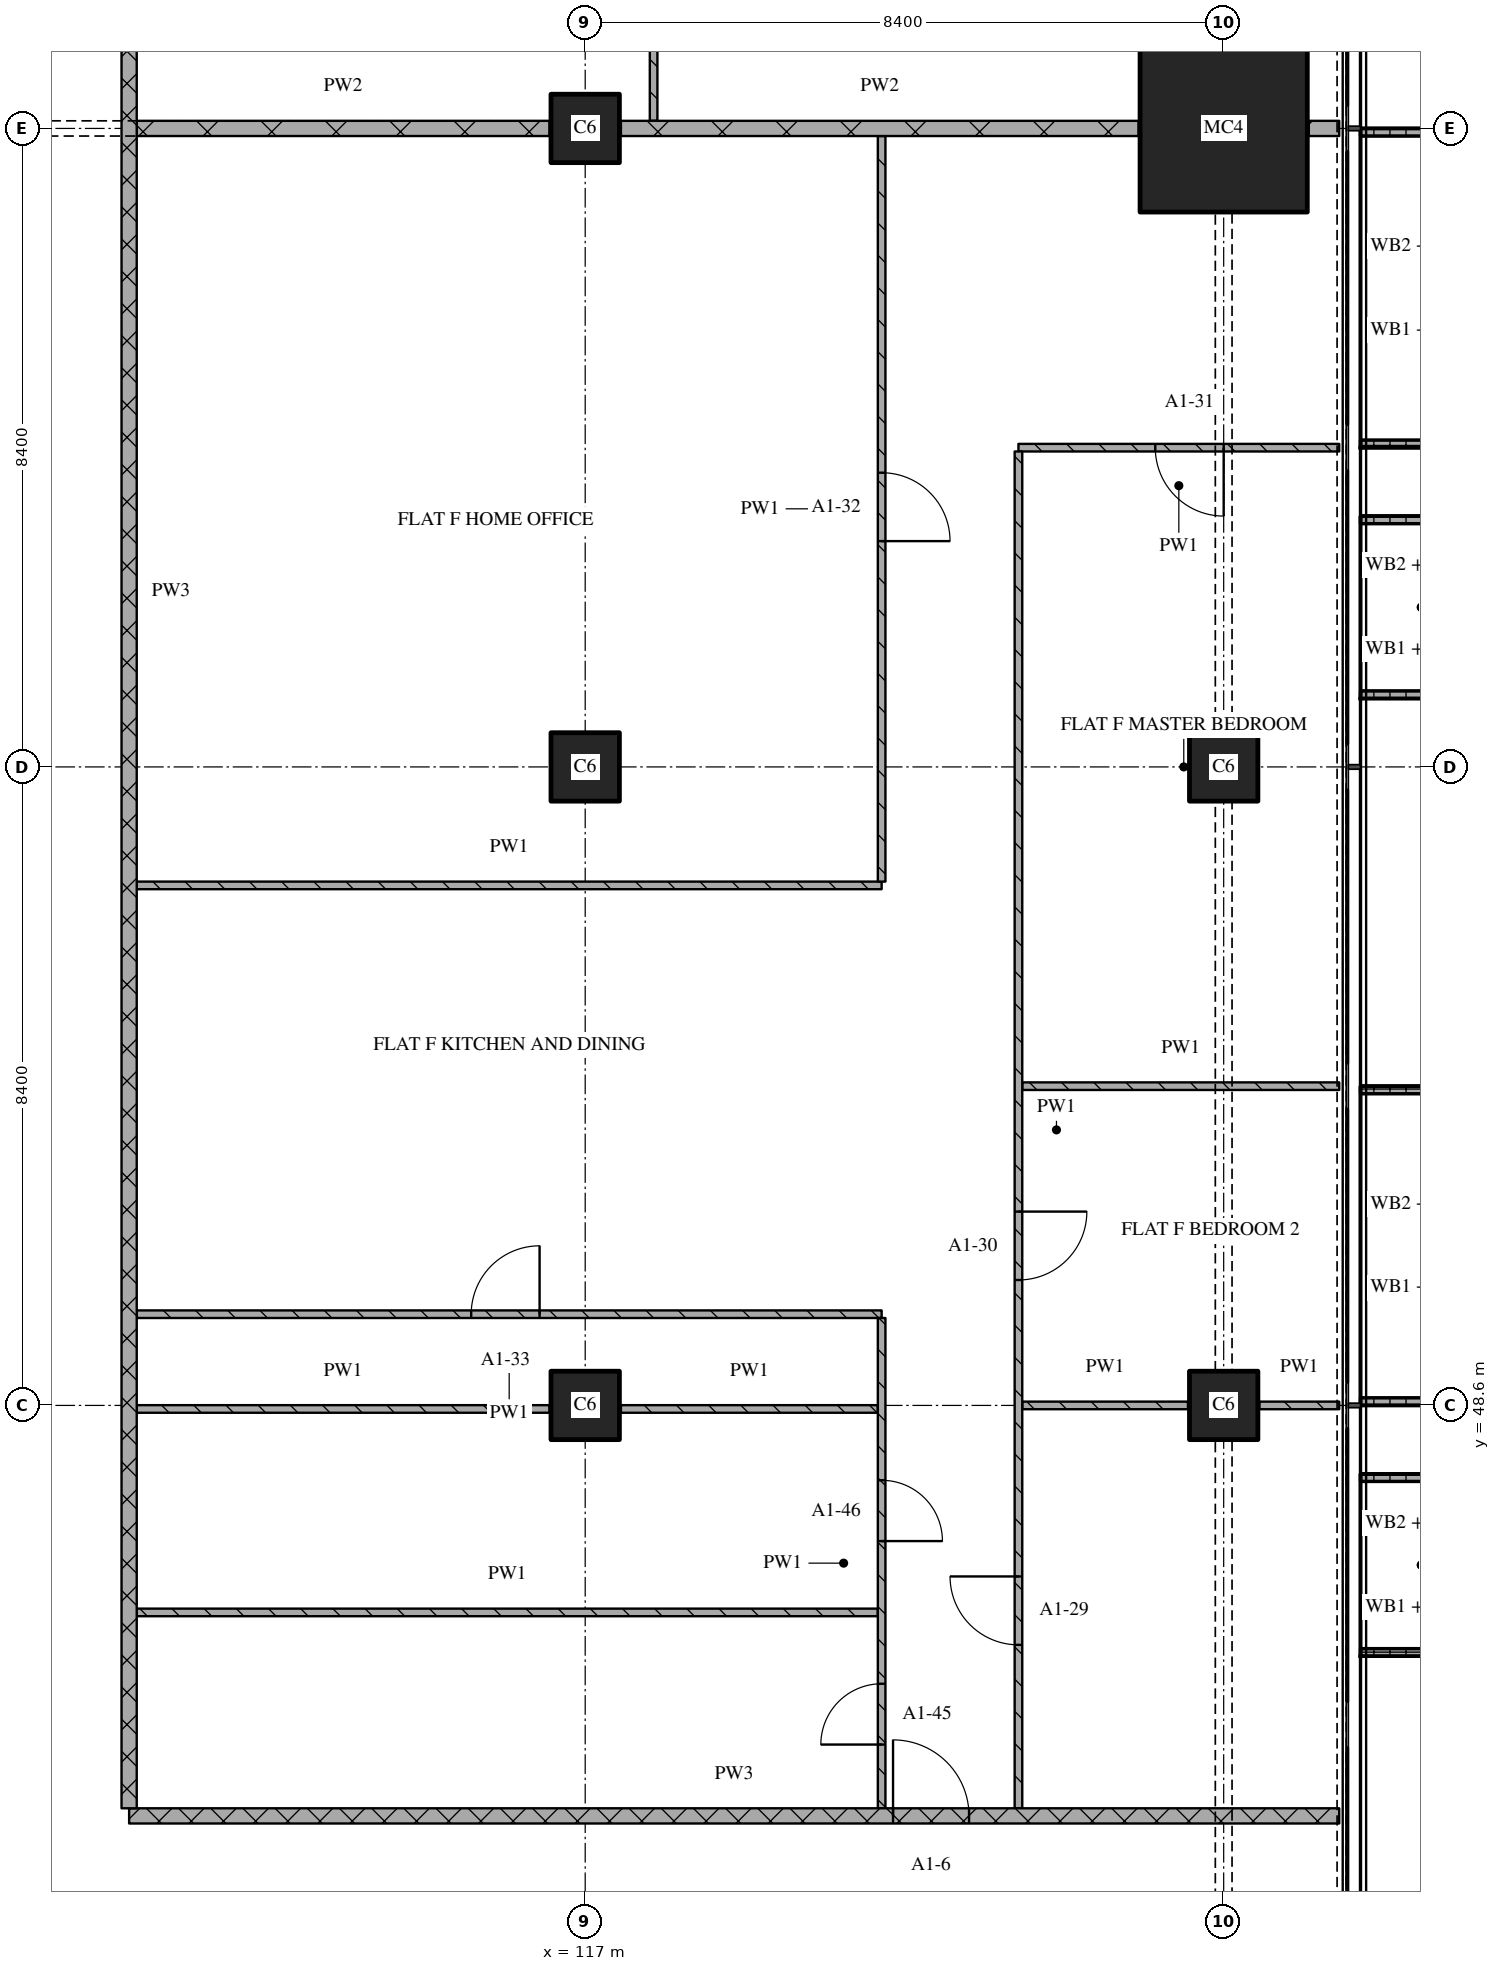
"""IFC4 building model, lengths in metres.
Left out: names, types, materials, properties, quantities, classifications, styles, units other than length and angle.
Written with IfcOpenShell. Run it as: python <this file> out.ifc"""

import sys

from ifc_helpers import new_model, si_unit, direction, frame, frame_2d, origin, origin_2d, place, context, subcontext, project, spatial, polyline, rectangle, outline, extrude, element, fill, save


model = new_model("IFC4")
c1 = context("Model", 3, precision=1e-05, world=origin(), true_north=direction((0.0, 1.0)))
c2 = subcontext(c1, "Body", "Model", "MODEL_VIEW")
j1 = project(units=[si_unit("LENGTHUNIT", "METRE"), si_unit("PLANEANGLEUNIT", "RADIAN")], contexts=[c1])
p1 = place(None, origin())
s1 = spatial("IfcSite", under=j1, at=p1, CompositionType="ELEMENT")
p2 = place(p1, origin())
s2 = spatial("IfcBuilding", under=s1, at=p2, CompositionType="ELEMENT")
p3 = place(p2, frame((0.0, 0.0, 40.8)))
s3 = spatial("IfcBuildingStorey", under=s2, at=p3, CompositionType="ELEMENT", Elevation=40.8)
for number, where, z_axis, x_axis in (
    (1, (117.0, 48.6, 0.0), (0.0, 0.0, 1.0), (1.0, 0.0, 0.0)),
    (2, (117.0, 57.0, 0.0), (0.0, 0.0, 1.0), (1.0, 0.0, 0.0)),
    (3, (117.0, 65.4, 0.0), (0.0, 0.0, 1.0), (1.0, 0.0, 0.0)),
    (4, (125.4, 48.6, 0.0), (0.0, 0.0, 1.0), (1.0, 0.0, 0.0)),
    (5, (125.4, 57.0, 0.0), (0.0, 0.0, 1.0), (1.0, 0.0, 0.0)),
):
    element("IfcColumn", number, at=place(p3, frame(where, z_axis=z_axis, x_axis=x_axis)), inside=s3, PredefinedType="COLUMN", context=c2, shape_type="SweptSolid", body=[
        extrude(rectangle(XDim=0.9, YDim=0.9, at=origin_2d()), origin(), (0.0, 0.0, 1.0), 3.6),
    ])
p4 = place(p3, frame((125.4, 65.4, 0.0), z_axis=(0.0, 0.0, 1.0), x_axis=(1.0, 0.0, 0.0)))
e6 = element("IfcColumn", 6, at=p4, inside=s3, PredefinedType="COLUMN", context=c2, shape_type="SweptSolid", body=[
    extrude(rectangle(XDim=2.2, YDim=2.2, at=origin_2d()), origin(), (0.0, 0.0, 1.0), 3.6),
])
p5 = place(p3, origin())
e7 = element("IfcWall", 7, at=p5, inside=s3, PredefinedType="SOLIDWALL", context=c2, shape_type="SweptSolid", body=[
    extrude(outline(polyline([(127.2, 45.3), (127.2, 45.4), (128.7, 45.4), (128.7, 47.6), (127.2, 47.6), (127.2, 47.7), (128.8, 47.7), (128.8, 45.3), (127.2, 45.3)])), origin(), (0.0, 0.0, 1.0), 1.0),
])
p6 = place(p3, origin())
e8 = element("IfcWall", 8, at=p6, inside=s3, PredefinedType="SOLIDWALL", context=c2, shape_type="SweptSolid", body=[
    extrude(outline(polyline([(127.2, 48.6), (127.2, 48.7), (128.833, 48.7), (128.833, 52.7), (127.2, 52.7), (127.2, 52.8), (128.933, 52.8), (128.933, 48.6), (127.2, 48.6)])), origin(), (0.0, 0.0, 1.0), 1.0),
])
p7 = place(p3, origin())
e9 = element("IfcWall", 9, at=p7, inside=s3, PredefinedType="SOLIDWALL", context=c2, shape_type="SweptSolid", body=[
    extrude(outline(polyline([(127.2, 57.9), (127.2, 58.0), (128.7, 58.0), (128.7, 60.2), (127.2, 60.2), (127.2, 60.3), (128.8, 60.3), (128.8, 57.9), (127.2, 57.9)])), origin(), (0.0, 0.0, 1.0), 1.0),
])
p8 = place(p3, origin())
e10 = element("IfcWall", 10, at=p8, inside=s3, PredefinedType="SOLIDWALL", context=c2, shape_type="SweptSolid", body=[
    extrude(outline(polyline([(127.2, 61.2), (127.2, 61.3), (128.833, 61.3), (128.833, 65.3), (127.2, 65.3), (127.2, 65.4), (128.933, 65.4), (128.933, 61.2), (127.2, 61.2)])), origin(), (0.0, 0.0, 1.0), 1.0),
])
p9 = place(p3, frame((111.0, 43.2, 0.0), z_axis=(0.0, 0.0, 1.0), x_axis=(1.0, 0.0, 0.0)))
e11 = element("IfcWall", 11, at=p9, inside=s3, PredefinedType="PARTITIONING", context=c2, shape_type="SweptSolid", body=[
    extrude(rectangle(XDim=15.92, YDim=0.2, at=frame_2d((7.96, 0.0))), origin(), (0.0, 0.0, 1.0), 3.32),
])
p10 = place(p9, frame((10.05, 0.0, 0.0)))
e12 = element("IfcOpeningElement", 12, at=p10, cuts=e11, PredefinedType="OPENING", context=c2, shape_type="SweptSolid", body=[
    extrude(rectangle(XDim=1.0, YDim=2.1, at=frame_2d((0.5, 1.05))), frame((0.0, 0.11, 0.0), z_axis=(0.0, -1.0, 0.0), x_axis=(1.0, 0.0, 0.0)), (0.0, 0.0, 1.0), 0.22),
])
p11 = place(p3, frame((111.1, 45.877, 0.0), z_axis=(0.0, 0.0, 1.0), x_axis=(1.0, 0.0, 0.0)))
e13 = element("IfcWall", 13, at=p11, inside=s3, PredefinedType="PARTITIONING", context=c2, shape_type="SweptSolid", body=[
    extrude(rectangle(XDim=9.75, YDim=0.1, at=frame_2d((4.875, 0.0))), origin(), (0.0, 0.0, 1.0), 3.32),
])
p12 = place(p3, frame((111.1, 48.553, 0.0), z_axis=(0.0, 0.0, 1.0), x_axis=(1.0, 0.0, 0.0)))
e14 = element("IfcWall", 14, at=p12, inside=s3, PredefinedType="PARTITIONING", context=c2, shape_type="SweptSolid", body=[
    extrude(rectangle(XDim=5.43, YDim=0.1, at=frame_2d((2.715, 0.0))), origin(), (0.0, 0.0, 1.0), 3.32),
])
p13 = place(p3, frame((117.47, 48.553, 0.0), z_axis=(0.0, 0.0, 1.0), x_axis=(1.0, 0.0, 0.0)))
e15 = element("IfcWall", 15, at=p13, inside=s3, PredefinedType="PARTITIONING", context=c2, shape_type="SweptSolid", body=[
    extrude(rectangle(XDim=3.38, YDim=0.1, at=frame_2d((1.69, 0.0))), origin(), (0.0, 0.0, 1.0), 3.32),
])
p14 = place(p3, frame((122.75, 48.6, 0.0), z_axis=(0.0, 0.0, 1.0), x_axis=(1.0, 0.0, 0.0)))
e16 = element("IfcWall", 16, at=p14, inside=s3, PredefinedType="PARTITIONING", context=c2, shape_type="SweptSolid", body=[
    extrude(rectangle(XDim=2.18, YDim=0.1, at=frame_2d((1.09, 0.0))), origin(), (0.0, 0.0, 1.0), 3.32),
])
p15 = place(p3, frame((125.87, 48.6, 0.0), z_axis=(0.0, 0.0, 1.0), x_axis=(1.0, 0.0, 0.0)))
e17 = element("IfcWall", 17, at=p15, inside=s3, PredefinedType="PARTITIONING", context=c2, shape_type="SweptSolid", body=[
    extrude(rectangle(XDim=1.05, YDim=0.1, at=frame_2d((0.525, 0.0))), origin(), (0.0, 0.0, 1.0), 3.32),
])
p16 = place(p3, frame((120.9, 49.8, 0.0), z_axis=(0.0, 0.0, 1.0), x_axis=(-1.0, 0.0, 0.0)))
e18 = element("IfcWall", 18, at=p16, inside=s3, PredefinedType="PARTITIONING", context=c2, shape_type="SweptSolid", body=[
    extrude(rectangle(XDim=9.8, YDim=0.1, at=frame_2d((4.9, 0.0))), origin(), (0.0, 0.0, 1.0), 3.32),
])
p17 = place(p16, frame((4.5, 0.0, 0.0)))
e19 = element("IfcOpeningElement", 19, at=p17, cuts=e18, PredefinedType="OPENING", context=c2, shape_type="SweptSolid", body=[
    extrude(rectangle(XDim=0.9, YDim=2.1, at=frame_2d((0.45, 1.05))), frame((0.0, 0.06, 0.0), z_axis=(0.0, -1.0, 0.0), x_axis=(1.0, 0.0, 0.0)), (0.0, 0.0, 1.0), 0.12),
])
p18 = place(p3, frame((122.75, 52.8, 0.0), z_axis=(0.0, 0.0, 1.0), x_axis=(1.0, 0.0, 0.0)))
e20 = element("IfcWall", 20, at=p18, inside=s3, PredefinedType="PARTITIONING", context=c2, shape_type="SweptSolid", body=[
    extrude(rectangle(XDim=4.17, YDim=0.1, at=frame_2d((2.085, 0.0))), origin(), (0.0, 0.0, 1.0), 3.32),
])
p19 = place(p3, frame((111.1, 55.441, 0.0), z_axis=(0.0, 0.0, 1.0), x_axis=(1.0, 0.0, 0.0)))
e21 = element("IfcWall", 21, at=p19, inside=s3, PredefinedType="PARTITIONING", context=c2, shape_type="SweptSolid", body=[
    extrude(rectangle(XDim=9.8, YDim=0.1, at=frame_2d((4.9, 0.0))), origin(), (0.0, 0.0, 1.0), 3.32),
])
p20 = place(p3, frame((126.92, 61.2, 0.0), z_axis=(0.0, 0.0, 1.0), x_axis=(-1.0, 0.0, 0.0)))
e22 = element("IfcWall", 22, at=p20, inside=s3, PredefinedType="PARTITIONING", context=c2, shape_type="SweptSolid", body=[
    extrude(rectangle(XDim=4.22, YDim=0.1, at=frame_2d((2.11, 0.0))), origin(), (0.0, 0.0, 1.0), 3.32),
])
p21 = place(p20, frame((1.52, 0.0, 0.0)))
e23 = element("IfcOpeningElement", 23, at=p21, cuts=e22, PredefinedType="OPENING", context=c2, shape_type="SweptSolid", body=[
    extrude(rectangle(XDim=0.9, YDim=2.1, at=frame_2d((0.45, 1.05))), frame((0.0, 0.06, 0.0), z_axis=(0.0, -1.0, 0.0), x_axis=(1.0, 0.0, 0.0)), (0.0, 0.0, 1.0), 0.12),
])
p22 = place(p3, frame((111.1, 65.4, 0.0), z_axis=(0.0, 0.0, 1.0), x_axis=(1.0, 0.0, 0.0)))
e24 = element("IfcWall", 24, at=p22, inside=s3, PredefinedType="PARTITIONING", context=c2, shape_type="SweptSolid", body=[
    extrude(rectangle(XDim=5.43, YDim=0.2, at=frame_2d((2.715, 0.0))), origin(), (0.0, 0.0, 1.0), 2.82),
])
p23 = place(p3, frame((117.47, 65.4, 0.0), z_axis=(0.0, 0.0, 1.0), x_axis=(1.0, 0.0, 0.0)))
e25 = element("IfcWall", 25, at=p23, inside=s3, PredefinedType="PARTITIONING", context=c2, shape_type="SweptSolid", body=[
    extrude(rectangle(XDim=6.81, YDim=0.2, at=frame_2d((3.405, 0.0))), origin(), (0.0, 0.0, 1.0), 3.32),
])
p24 = place(p3, frame((126.52, 65.4, 0.0), z_axis=(0.0, 0.0, 1.0), x_axis=(1.0, 0.0, 0.0)))
e26 = element("IfcWall", 26, at=p24, inside=s3, PredefinedType="PARTITIONING", context=c2, shape_type="SweptSolid", body=[
    extrude(rectangle(XDim=0.4, YDim=0.2, at=frame_2d((0.2, 0.0))), origin(), (0.0, 0.0, 1.0), 3.32),
])
p25 = place(p3, frame((111.0, 75.32, 0.0), z_axis=(0.0, 0.0, 1.0), x_axis=(0.0, -1.0, 0.0)))
e27 = element("IfcWall", 27, at=p25, inside=s3, PredefinedType="PARTITIONING", context=c2, shape_type="SweptSolid", body=[
    extrude(rectangle(XDim=32.02, YDim=0.2, at=frame_2d((16.01, 0.0))), origin(), (0.0, 0.0, 1.0), 3.32),
])
p26 = place(p25, frame((5.67, 0.0, 0.0)))
e28 = element("IfcOpeningElement", 28, at=p26, cuts=e27, PredefinedType="OPENING", context=c2, shape_type="SweptSolid", body=[
    extrude(rectangle(XDim=1.0, YDim=2.1, at=frame_2d((0.5, 1.05))), frame((0.0, 0.11, 0.0), z_axis=(0.0, -1.0, 0.0), x_axis=(1.0, 0.0, 0.0)), (0.0, 0.0, 1.0), 0.22),
])
p27 = place(p3, frame((117.9, 65.5, 0.0), z_axis=(0.0, 0.0, 1.0), x_axis=(0.0, 1.0, 0.0)))
e29 = element("IfcWall", 29, at=p27, inside=s3, PredefinedType="PARTITIONING", context=c2, shape_type="SweptSolid", body=[
    extrude(rectangle(XDim=2.85, YDim=0.1, at=frame_2d((1.425, 0.0))), origin(), (0.0, 0.0, 1.0), 3.32),
])
p28 = place(p27, frame((1.0, 0.0, 0.0)))
e30 = element("IfcOpeningElement", 30, at=p28, cuts=e29, PredefinedType="OPENING", context=c2, shape_type="SweptSolid", body=[
    extrude(rectangle(XDim=0.8, YDim=2.1, at=frame_2d((0.4, 1.05))), frame((0.0, 0.06, 0.0), z_axis=(0.0, -1.0, 0.0), x_axis=(1.0, 0.0, 0.0)), (0.0, 0.0, 1.0), 0.12),
])
p29 = place(p3, frame((120.9, 43.3, 0.0), z_axis=(0.0, 0.0, 1.0), x_axis=(0.0, 1.0, 0.0)))
e31 = element("IfcWall", 31, at=p29, inside=s3, PredefinedType="PARTITIONING", context=c2, shape_type="SweptSolid", body=[
    extrude(rectangle(XDim=6.45, YDim=0.1, at=frame_2d((3.225, 0.0))), origin(), (0.0, 0.0, 1.0), 3.32),
])
p30 = place(p29, frame((0.838, 0.0, 0.0)))
e32 = element("IfcOpeningElement", 32, at=p30, cuts=e31, PredefinedType="OPENING", context=c2, shape_type="SweptSolid", body=[
    extrude(rectangle(XDim=0.8, YDim=2.1, at=frame_2d((0.4, 1.05))), frame((0.0, 0.06, 0.0), z_axis=(0.0, -1.0, 0.0), x_axis=(1.0, 0.0, 0.0)), (0.0, 0.0, 1.0), 0.12),
])
p31 = place(p29, frame((3.515, 0.0, 0.0)))
e33 = element("IfcOpeningElement", 33, at=p31, cuts=e31, PredefinedType="OPENING", context=c2, shape_type="SweptSolid", body=[
    extrude(rectangle(XDim=0.8, YDim=2.1, at=frame_2d((0.4, 1.05))), frame((0.0, 0.06, 0.0), z_axis=(0.0, -1.0, 0.0), x_axis=(1.0, 0.0, 0.0)), (0.0, 0.0, 1.0), 0.12),
])
p32 = place(p3, frame((120.9, 55.491, 0.0), z_axis=(0.0, 0.0, 1.0), x_axis=(0.0, 1.0, 0.0)))
e34 = element("IfcWall", 34, at=p32, inside=s3, PredefinedType="PARTITIONING", context=c2, shape_type="SweptSolid", body=[
    extrude(rectangle(XDim=9.809, YDim=0.1, at=frame_2d((4.904, 0.0))), origin(), (0.0, 0.0, 1.0), 3.32),
])
p33 = place(p32, frame((4.479, 0.0, 0.0)))
e35 = element("IfcOpeningElement", 35, at=p33, cuts=e34, PredefinedType="OPENING", context=c2, shape_type="SweptSolid", body=[
    extrude(rectangle(XDim=0.9, YDim=2.1, at=frame_2d((0.45, 1.05))), frame((0.0, 0.06, 0.0), z_axis=(0.0, -1.0, 0.0), x_axis=(1.0, 0.0, 0.0)), (0.0, 0.0, 1.0), 0.12),
])
p34 = place(p3, frame((122.7, 61.15, 0.0), z_axis=(0.0, 0.0, 1.0), x_axis=(0.0, -1.0, 0.0)))
e36 = element("IfcWall", 36, at=p34, inside=s3, PredefinedType="PARTITIONING", context=c2, shape_type="SweptSolid", body=[
    extrude(rectangle(XDim=17.85, YDim=0.1, at=frame_2d((8.925, 0.0))), origin(), (0.0, 0.0, 1.0), 3.32),
])
p35 = place(p34, frame((10.0, 0.0, 0.0)))
e37 = element("IfcOpeningElement", 37, at=p35, cuts=e36, PredefinedType="OPENING", context=c2, shape_type="SweptSolid", body=[
    extrude(rectangle(XDim=0.9, YDim=2.1, at=frame_2d((0.45, 1.05))), frame((0.0, 0.06, 0.0), z_axis=(0.0, -1.0, 0.0), x_axis=(1.0, 0.0, 0.0)), (0.0, 0.0, 1.0), 0.12),
])
p36 = place(p34, frame((14.8, 0.0, 0.0)))
e38 = element("IfcOpeningElement", 38, at=p36, cuts=e36, PredefinedType="OPENING", context=c2, shape_type="SweptSolid", body=[
    extrude(rectangle(XDim=0.9, YDim=2.1, at=frame_2d((0.45, 1.05))), frame((0.0, 0.06, 0.0), z_axis=(0.0, -1.0, 0.0), x_axis=(1.0, 0.0, 0.0)), (0.0, 0.0, 1.0), 0.12),
])
p37 = place(p10, origin())
e39 = element("IfcDoor", 39, at=p37, inside=s3, OperationType="SINGLE_SWING_LEFT", PredefinedType="DOOR", context=c2, shape_type="SweptSolid", body=[
    extrude(rectangle(XDim=1.0, YDim=2.1, at=frame_2d((0.5, 1.05))), frame((0.0, 0.025, 0.0), z_axis=(0.0, -1.0, 0.0), x_axis=(1.0, 0.0, 0.0)), (0.0, 0.0, 1.0), 0.05),
])
fill(e12, e39)
p38 = place(p17, origin())
e40 = element("IfcDoor", 40, at=p38, inside=s3, OperationType="SINGLE_SWING_RIGHT", PredefinedType="DOOR", context=c2, shape_type="SweptSolid", body=[
    extrude(rectangle(XDim=0.9, YDim=2.1, at=frame_2d((0.45, 1.05))), frame((0.0, 0.025, 0.0), z_axis=(0.0, -1.0, 0.0), x_axis=(1.0, 0.0, 0.0)), (0.0, 0.0, 1.0), 0.05),
])
fill(e19, e40)
p39 = place(p21, origin())
e41 = element("IfcDoor", 41, at=p39, inside=s3, OperationType="SINGLE_SWING_LEFT", PredefinedType="DOOR", context=c2, shape_type="SweptSolid", body=[
    extrude(rectangle(XDim=0.9, YDim=2.1, at=frame_2d((0.45, 1.05))), frame((0.0, 0.025, 0.0), z_axis=(0.0, -1.0, 0.0), x_axis=(1.0, 0.0, 0.0)), (0.0, 0.0, 1.0), 0.05),
])
fill(e23, e41)
p40 = place(p30, origin())
e42 = element("IfcDoor", 42, at=p40, inside=s3, OperationType="SINGLE_SWING_LEFT", PredefinedType="DOOR", context=c2, shape_type="SweptSolid", body=[
    extrude(rectangle(XDim=0.8, YDim=2.1, at=frame_2d((0.4, 1.05))), frame((0.0, 0.025, 0.0), z_axis=(0.0, -1.0, 0.0), x_axis=(1.0, 0.0, 0.0)), (0.0, 0.0, 1.0), 0.05),
])
fill(e32, e42)
p41 = place(p31, origin())
e43 = element("IfcDoor", 43, at=p41, inside=s3, OperationType="SINGLE_SWING_RIGHT", PredefinedType="DOOR", context=c2, shape_type="SweptSolid", body=[
    extrude(rectangle(XDim=0.8, YDim=2.1, at=frame_2d((0.4, 1.05))), frame((0.0, 0.025, 0.0), z_axis=(0.0, -1.0, 0.0), x_axis=(1.0, 0.0, 0.0)), (0.0, 0.0, 1.0), 0.05),
])
fill(e33, e43)
p42 = place(p33, origin())
e44 = element("IfcDoor", 44, at=p42, inside=s3, OperationType="SINGLE_SWING_RIGHT", PredefinedType="DOOR", context=c2, shape_type="SweptSolid", body=[
    extrude(rectangle(XDim=0.9, YDim=2.1, at=frame_2d((0.45, 1.05))), frame((0.0, 0.025, 0.0), z_axis=(0.0, -1.0, 0.0), x_axis=(1.0, 0.0, 0.0)), (0.0, 0.0, 1.0), 0.05),
])
fill(e35, e44)
p43 = place(p35, origin())
e45 = element("IfcDoor", 45, at=p43, inside=s3, OperationType="SINGLE_SWING_LEFT", PredefinedType="DOOR", context=c2, shape_type="SweptSolid", body=[
    extrude(rectangle(XDim=0.9, YDim=2.1, at=frame_2d((0.45, 1.05))), frame((0.0, 0.025, 0.0), z_axis=(0.0, -1.0, 0.0), x_axis=(1.0, 0.0, 0.0)), (0.0, 0.0, 1.0), 0.05),
])
fill(e37, e45)
p44 = place(p36, origin())
e46 = element("IfcDoor", 46, at=p44, inside=s3, OperationType="SINGLE_SWING_RIGHT", PredefinedType="DOOR", context=c2, shape_type="SweptSolid", body=[
    extrude(rectangle(XDim=0.9, YDim=2.1, at=frame_2d((0.45, 1.05))), frame((0.0, 0.025, 0.0), z_axis=(0.0, -1.0, 0.0), x_axis=(1.0, 0.0, 0.0)), (0.0, 0.0, 1.0), 0.05),
])
fill(e38, e46)
save(model, sys.argv[1])
